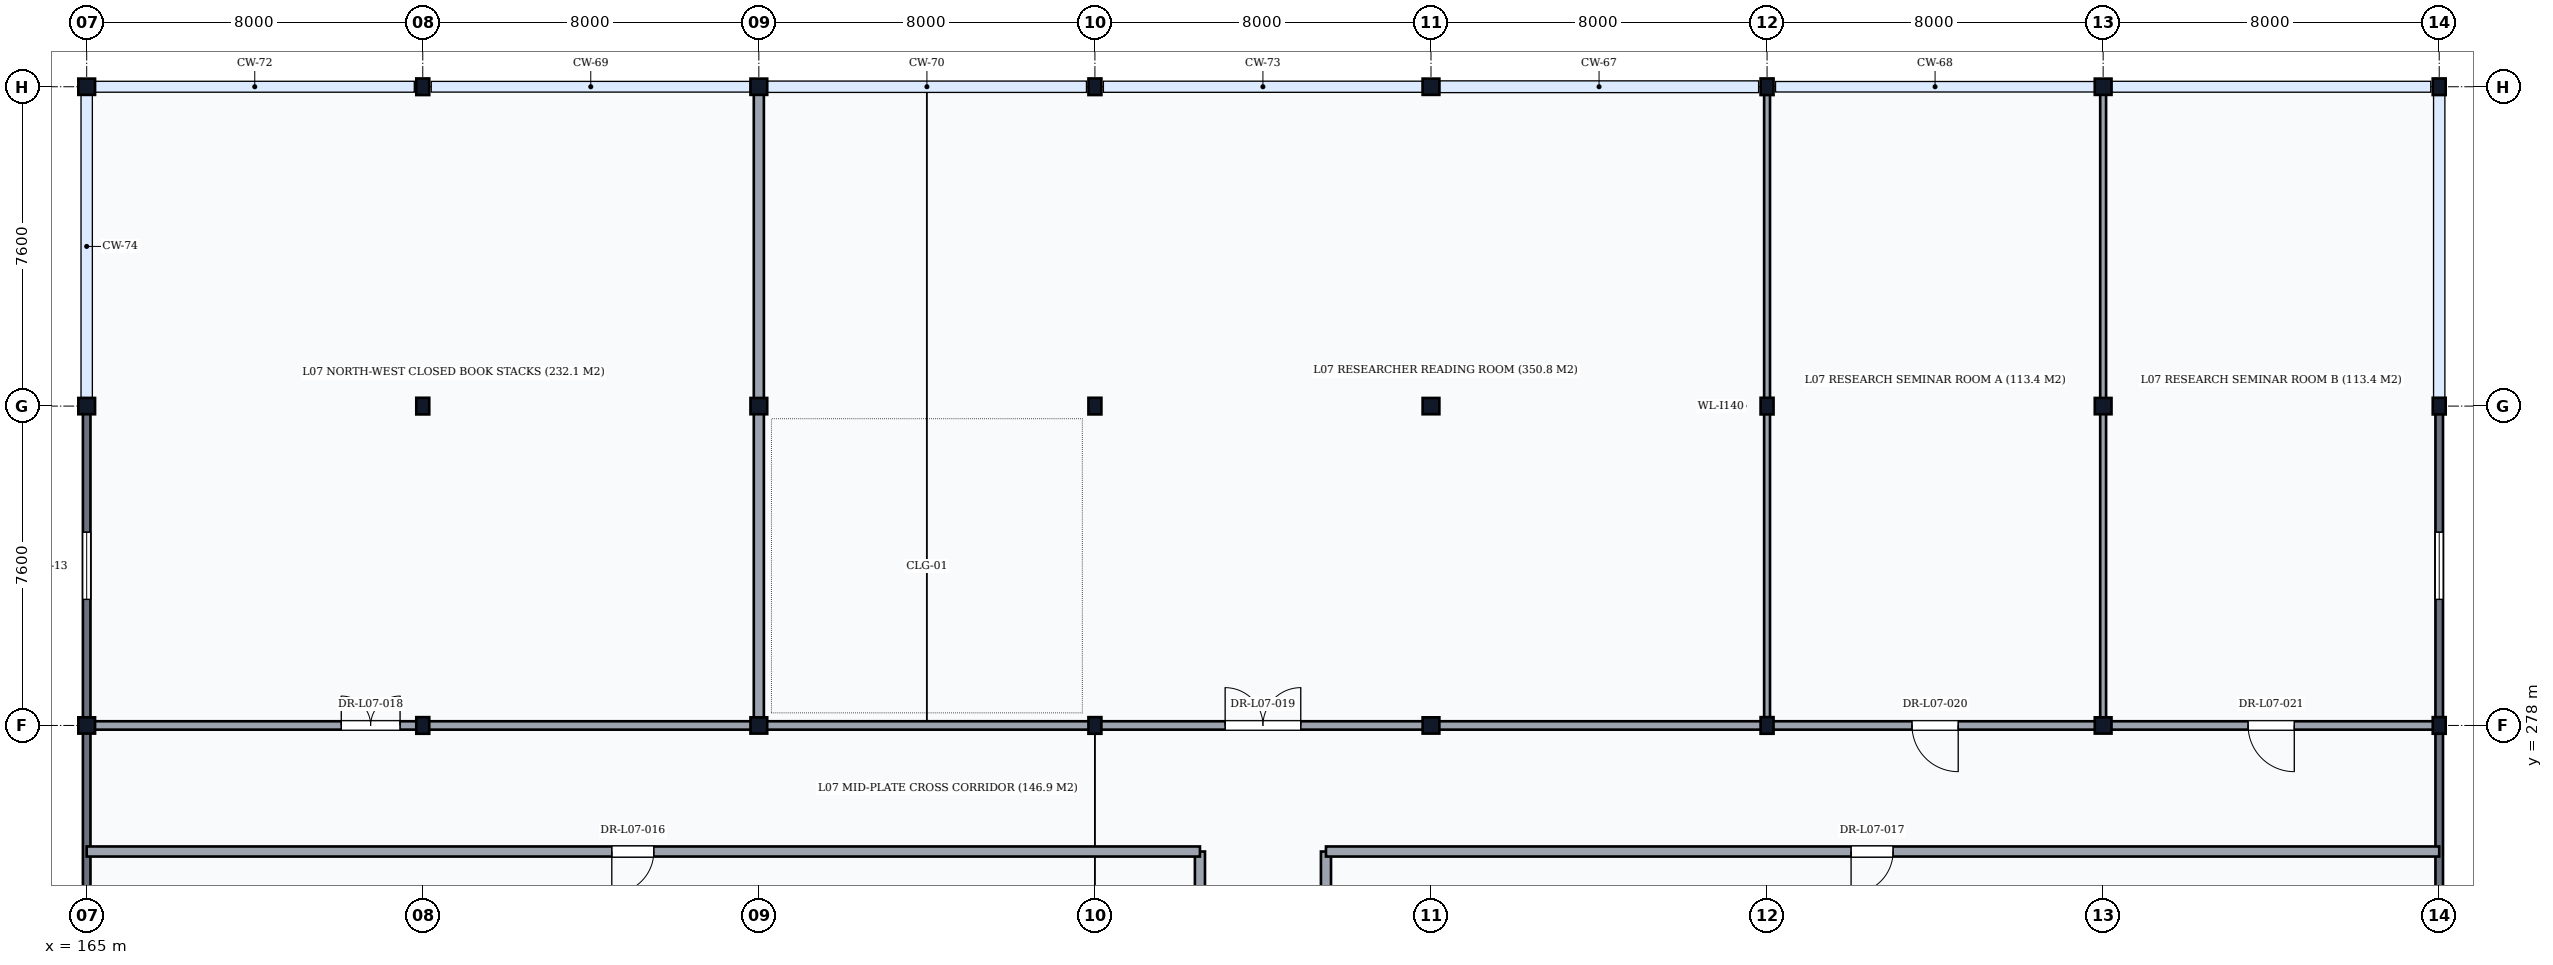
"""IFC4 building model, lengths in metres.
Left out: names, types, materials, properties, quantities, classifications, styles, units other than length and angle.
Written with IfcOpenShell. Run it as: python <this file> out.ifc"""

import sys

from ifc_helpers import new_model, si_unit, direction, frame, frame_2d, origin, origin_2d, place, context, subcontext, project, spatial, rectangle, i_section, extrude, element, fill, save


model = new_model("IFC4")
c1 = context("Model", 3, precision=1e-05, world=origin(), true_north=direction((0.0, 1.0)))
c2 = subcontext(c1, "Body", "Model", "MODEL_VIEW")
j1 = project(units=[si_unit("LENGTHUNIT", "METRE"), si_unit("PLANEANGLEUNIT", "RADIAN")], contexts=[c1])
p1 = place(None, origin())
s1 = spatial("IfcSite", under=j1, at=p1, CompositionType="ELEMENT")
p2 = place(p1, origin())
s2 = spatial("IfcBuilding", under=s1, at=p2, CompositionType="ELEMENT")
p3 = place(p2, frame((0.0, 0.0, 28.2)))
s3 = spatial("IfcBuildingStorey", under=s2, at=p3, CompositionType="ELEMENT", Elevation=28.2)
for number, where, z_axis, x_axis in (
    (1, (165.0, 278.0, 0.0), (0.0, 0.0, 1.0), (1.0, 0.0, 0.0)),
    (2, (165.0, 285.6, 0.0), (0.0, 0.0, 1.0), (1.0, 0.0, 0.0)),
    (3, (165.0, 293.2, 0.0), (0.0, 0.0, 1.0), (1.0, 0.0, 0.0)),
):
    element("IfcColumn", number, at=place(p3, frame(where, z_axis=z_axis, x_axis=x_axis)), inside=s3, PredefinedType="COLUMN", context=c2, shape_type="SweptSolid", body=[
        extrude(i_section(OverallWidth=0.398, OverallDepth=0.387, WebThickness=0.021, FlangeThickness=0.033, FilletRadius=0.015, at=origin_2d()), origin(), (0.0, 0.0, 1.0), 3.9),
    ])
for number, where, z_axis, x_axis in (
    (4, (173.0, 278.0, 0.0), (0.0, 0.0, 1.0), (1.0, 0.0, 0.0)),
    (5, (173.0, 285.6, 0.0), (0.0, 0.0, 1.0), (1.0, 0.0, 0.0)),
    (6, (173.0, 293.2, 0.0), (0.0, 0.0, 1.0), (1.0, 0.0, 0.0)),
):
    element("IfcColumn", number, at=place(p3, frame(where, z_axis=z_axis, x_axis=x_axis)), inside=s3, PredefinedType="COLUMN", context=c2, shape_type="SweptSolid", body=[
        extrude(i_section(OverallWidth=0.308, OverallDepth=0.395, WebThickness=0.021, FlangeThickness=0.04, FilletRadius=0.027, at=origin_2d()), origin(), (0.0, 0.0, 1.0), 3.9),
    ])
for number, where, z_axis, x_axis in (
    (7, (181.0, 278.0, 0.0), (0.0, 0.0, 1.0), (1.0, 0.0, 0.0)),
    (8, (181.0, 285.6, 0.0), (0.0, 0.0, 1.0), (1.0, 0.0, 0.0)),
    (9, (181.0, 293.2, 0.0), (0.0, 0.0, 1.0), (1.0, 0.0, 0.0)),
):
    element("IfcColumn", number, at=place(p3, frame(where, z_axis=z_axis, x_axis=x_axis)), inside=s3, PredefinedType="COLUMN", context=c2, shape_type="SweptSolid", body=[
        extrude(i_section(OverallWidth=0.398, OverallDepth=0.387, WebThickness=0.021, FlangeThickness=0.033, FilletRadius=0.015, at=origin_2d()), origin(), (0.0, 0.0, 1.0), 3.9),
    ])
for number, where, z_axis, x_axis in (
    (10, (189.0, 278.0, 0.0), (0.0, 0.0, 1.0), (1.0, 0.0, 0.0)),
    (11, (189.0, 285.6, 0.0), (0.0, 0.0, 1.0), (1.0, 0.0, 0.0)),
    (12, (189.0, 293.2, 0.0), (0.0, 0.0, 1.0), (1.0, 0.0, 0.0)),
):
    element("IfcColumn", number, at=place(p3, frame(where, z_axis=z_axis, x_axis=x_axis)), inside=s3, PredefinedType="COLUMN", context=c2, shape_type="SweptSolid", body=[
        extrude(i_section(OverallWidth=0.308, OverallDepth=0.395, WebThickness=0.021, FlangeThickness=0.04, FilletRadius=0.027, at=origin_2d()), origin(), (0.0, 0.0, 1.0), 3.9),
    ])
for number, where, z_axis, x_axis in (
    (13, (197.0, 278.0, 0.0), (0.0, 0.0, 1.0), (1.0, 0.0, 0.0)),
    (14, (197.0, 285.6, 0.0), (0.0, 0.0, 1.0), (1.0, 0.0, 0.0)),
    (15, (197.0, 293.2, 0.0), (0.0, 0.0, 1.0), (1.0, 0.0, 0.0)),
):
    element("IfcColumn", number, at=place(p3, frame(where, z_axis=z_axis, x_axis=x_axis)), inside=s3, PredefinedType="COLUMN", context=c2, shape_type="SweptSolid", body=[
        extrude(i_section(OverallWidth=0.398, OverallDepth=0.387, WebThickness=0.021, FlangeThickness=0.033, FilletRadius=0.015, at=origin_2d()), origin(), (0.0, 0.0, 1.0), 3.9),
    ])
for number, where, z_axis, x_axis in (
    (16, (205.0, 278.0, 0.0), (0.0, 0.0, 1.0), (1.0, 0.0, 0.0)),
    (17, (205.0, 285.6, 0.0), (0.0, 0.0, 1.0), (1.0, 0.0, 0.0)),
    (18, (205.0, 293.2, 0.0), (0.0, 0.0, 1.0), (1.0, 0.0, 0.0)),
):
    element("IfcColumn", number, at=place(p3, frame(where, z_axis=z_axis, x_axis=x_axis)), inside=s3, PredefinedType="COLUMN", context=c2, shape_type="SweptSolid", body=[
        extrude(i_section(OverallWidth=0.308, OverallDepth=0.395, WebThickness=0.021, FlangeThickness=0.04, FilletRadius=0.027, at=origin_2d()), origin(), (0.0, 0.0, 1.0), 3.9),
    ])
for number, where, z_axis, x_axis in (
    (19, (213.0, 278.0, 0.0), (0.0, 0.0, 1.0), (1.0, 0.0, 0.0)),
    (20, (213.0, 285.6, 0.0), (0.0, 0.0, 1.0), (1.0, 0.0, 0.0)),
    (21, (213.0, 293.2, 0.0), (0.0, 0.0, 1.0), (1.0, 0.0, 0.0)),
):
    element("IfcColumn", number, at=place(p3, frame(where, z_axis=z_axis, x_axis=x_axis)), inside=s3, PredefinedType="COLUMN", context=c2, shape_type="SweptSolid", body=[
        extrude(i_section(OverallWidth=0.398, OverallDepth=0.387, WebThickness=0.021, FlangeThickness=0.033, FilletRadius=0.015, at=origin_2d()), origin(), (0.0, 0.0, 1.0), 3.9),
    ])
for number, where, z_axis, x_axis in (
    (22, (221.0, 278.0, 0.0), (0.0, 0.0, 1.0), (1.0, 0.0, 0.0)),
    (23, (221.0, 285.6, 0.0), (0.0, 0.0, 1.0), (1.0, 0.0, 0.0)),
    (24, (221.0, 293.2, 0.0), (0.0, 0.0, 1.0), (1.0, 0.0, 0.0)),
):
    element("IfcColumn", number, at=place(p3, frame(where, z_axis=z_axis, x_axis=x_axis)), inside=s3, PredefinedType="COLUMN", context=c2, shape_type="SweptSolid", body=[
        extrude(i_section(OverallWidth=0.308, OverallDepth=0.395, WebThickness=0.021, FlangeThickness=0.04, FilletRadius=0.027, at=origin_2d()), origin(), (0.0, 0.0, 1.0), 3.9),
    ])
p4 = place(p3, frame((165.0, 270.406, 0.0), z_axis=(0.0, 0.0, 1.0), x_axis=(0.0, 1.0, 0.0)))
e25 = element("IfcWall", 25, at=p4, inside=s3, PredefinedType="SOLIDWALL", context=c2, shape_type="SweptSolid", body=[
    extrude(rectangle(XDim=7.588, YDim=0.18, at=frame_2d((3.794, 0.0))), origin(), (0.0, 0.0, 1.0), 3.388),
])
p5 = place(p4, frame((1.622, 0.0, 0.95)))
e26 = element("IfcOpeningElement", 26, at=p5, cuts=e25, PredefinedType="OPENING", context=c2, shape_type="SweptSolid", body=[
    extrude(rectangle(XDim=1.8, YDim=2.0, at=frame_2d((0.9, 1.0))), frame((0.0, 0.105, 0.0), z_axis=(0.0, -1.0, 0.0), x_axis=(1.0, 0.0, 0.0)), (0.0, 0.0, 1.0), 0.21),
])
p6 = place(p3, frame((165.0, 278.006, 0.0), z_axis=(0.0, 0.0, 1.0), x_axis=(0.0, 1.0, 0.0)))
e27 = element("IfcWall", 27, at=p6, inside=s3, PredefinedType="SOLIDWALL", context=c2, shape_type="SweptSolid", body=[
    extrude(rectangle(XDim=7.588, YDim=0.18, at=frame_2d((3.794, 0.0))), origin(), (0.0, 0.0, 1.0), 3.388),
])
p7 = place(p6, frame((2.994, 0.0, 0.95)))
e28 = element("IfcOpeningElement", 28, at=p7, cuts=e27, PredefinedType="OPENING", context=c2, shape_type="SweptSolid", body=[
    extrude(rectangle(XDim=1.6, YDim=2.0, at=frame_2d((0.8, 1.0))), frame((0.0, 0.105, 0.0), z_axis=(0.0, -1.0, 0.0), x_axis=(1.0, 0.0, 0.0)), (0.0, 0.0, 1.0), 0.21),
])
p8 = place(p3, frame((221.0, 270.406, 0.0), z_axis=(0.0, 0.0, 1.0), x_axis=(0.0, 1.0, 0.0)))
e29 = element("IfcWall", 29, at=p8, inside=s3, PredefinedType="SOLIDWALL", context=c2, shape_type="SweptSolid", body=[
    extrude(rectangle(XDim=7.588, YDim=0.18, at=frame_2d((3.794, 0.0))), origin(), (0.0, 0.0, 1.0), 3.388),
])
p9 = place(p8, frame((1.622, 0.0, 0.95)))
e30 = element("IfcOpeningElement", 30, at=p9, cuts=e29, PredefinedType="OPENING", context=c2, shape_type="SweptSolid", body=[
    extrude(rectangle(XDim=1.8, YDim=2.0, at=frame_2d((0.9, 1.0))), frame((0.0, 0.105, 0.0), z_axis=(0.0, -1.0, 0.0), x_axis=(1.0, 0.0, 0.0)), (0.0, 0.0, 1.0), 0.21),
])
p10 = place(p3, frame((221.0, 278.006, 0.0), z_axis=(0.0, 0.0, 1.0), x_axis=(0.0, 1.0, 0.0)))
e31 = element("IfcWall", 31, at=p10, inside=s3, PredefinedType="SOLIDWALL", context=c2, shape_type="SweptSolid", body=[
    extrude(rectangle(XDim=7.588, YDim=0.18, at=frame_2d((3.794, 0.0))), origin(), (0.0, 0.0, 1.0), 3.388),
])
p11 = place(p10, frame((2.994, 0.0, 0.95)))
e32 = element("IfcOpeningElement", 32, at=p11, cuts=e31, PredefinedType="OPENING", context=c2, shape_type="SweptSolid", body=[
    extrude(rectangle(XDim=1.6, YDim=2.0, at=frame_2d((0.8, 1.0))), frame((0.0, 0.105, 0.0), z_axis=(0.0, -1.0, 0.0), x_axis=(1.0, 0.0, 0.0)), (0.0, 0.0, 1.0), 0.21),
])
for number, where, z_axis, x_axis in (
    (33, (191.5, 258.2, 0.0), (0.0, 0.0, 1.0), (0.0, 1.0, 0.0)),
    (34, (194.5, 258.2, 0.0), (0.0, 0.0, 1.0), (0.0, 1.0, 0.0)),
):
    element("IfcWall", number, at=place(p3, frame(where, z_axis=z_axis, x_axis=x_axis)), inside=s3, PredefinedType="PARTITIONING", context=c2, shape_type="SweptSolid", body=[
        extrude(rectangle(XDim=16.8, YDim=0.24, at=frame_2d((8.4, 0.0))), origin(), (0.0, 0.0, 1.0), 3.66),
    ])
p12 = place(p3, frame((165.0, 275.0, 0.0), z_axis=(0.0, 0.0, 1.0), x_axis=(1.0, 0.0, 0.0)))
e35 = element("IfcWall", 35, at=p12, inside=s3, PredefinedType="PARTITIONING", context=c2, shape_type="SweptSolid", body=[
    extrude(rectangle(XDim=26.5, YDim=0.24, at=frame_2d((13.25, 0.0))), origin(), (0.0, 0.0, 1.0), 3.66),
])
p13 = place(p12, frame((12.5, 0.0, 0.0)))
e36 = element("IfcOpeningElement", 36, at=p13, cuts=e35, PredefinedType="OPENING", context=c2, shape_type="SweptSolid", body=[
    extrude(rectangle(XDim=1.0, YDim=2.1, at=frame_2d((0.5, 1.05))), frame((0.0, 0.135, 0.0), z_axis=(0.0, -1.0, 0.0), x_axis=(1.0, 0.0, 0.0)), (0.0, 0.0, 1.0), 0.27),
])
p14 = place(p3, frame((194.5, 275.0, 0.0), z_axis=(0.0, 0.0, 1.0), x_axis=(1.0, 0.0, 0.0)))
e37 = element("IfcWall", 37, at=p14, inside=s3, PredefinedType="PARTITIONING", context=c2, shape_type="SweptSolid", body=[
    extrude(rectangle(XDim=26.5, YDim=0.24, at=frame_2d((13.25, 0.0))), origin(), (0.0, 0.0, 1.0), 3.66),
])
p15 = place(p14, frame((12.5, 0.0, 0.0)))
e38 = element("IfcOpeningElement", 38, at=p15, cuts=e37, PredefinedType="OPENING", context=c2, shape_type="SweptSolid", body=[
    extrude(rectangle(XDim=1.0, YDim=2.1, at=frame_2d((0.5, 1.05))), frame((0.0, 0.135, 0.0), z_axis=(0.0, -1.0, 0.0), x_axis=(1.0, 0.0, 0.0)), (0.0, 0.0, 1.0), 0.27),
])
p16 = place(p3, frame((165.0, 278.0, 0.0), z_axis=(0.0, 0.0, 1.0), x_axis=(1.0, 0.0, 0.0)))
e39 = element("IfcWall", 39, at=p16, inside=s3, PredefinedType="PARTITIONING", context=c2, shape_type="SweptSolid", body=[
    extrude(rectangle(XDim=56.0, YDim=0.2, at=frame_2d((28.0, 0.0))), origin(), (0.0, 0.0, 1.0), 3.058),
])
p17 = place(p16, frame((6.06, 0.0, 0.0)))
e40 = element("IfcOpeningElement", 40, at=p17, cuts=e39, PredefinedType="OPENING", context=c2, shape_type="SweptSolid", body=[
    extrude(rectangle(XDim=1.4, YDim=2.1, at=frame_2d((0.7, 1.05))), frame((0.0, 0.115, 0.0), z_axis=(0.0, -1.0, 0.0), x_axis=(1.0, 0.0, 0.0)), (0.0, 0.0, 1.0), 0.23),
])
p18 = place(p16, frame((27.1, 0.0, 0.0)))
e41 = element("IfcOpeningElement", 41, at=p18, cuts=e39, PredefinedType="OPENING", context=c2, shape_type="SweptSolid", body=[
    extrude(rectangle(XDim=1.8, YDim=2.4, at=frame_2d((0.9, 1.2))), frame((0.0, 0.115, 0.0), z_axis=(0.0, -1.0, 0.0), x_axis=(1.0, 0.0, 0.0)), (0.0, 0.0, 1.0), 0.23),
])
p19 = place(p16, frame((43.45, 0.0, 0.0)))
e42 = element("IfcOpeningElement", 42, at=p19, cuts=e39, PredefinedType="OPENING", context=c2, shape_type="SweptSolid", body=[
    extrude(rectangle(XDim=1.1, YDim=2.1, at=frame_2d((0.55, 1.05))), frame((0.0, 0.115, 0.0), z_axis=(0.0, -1.0, 0.0), x_axis=(1.0, 0.0, 0.0)), (0.0, 0.0, 1.0), 0.23),
])
p20 = place(p16, frame((51.45, 0.0, 0.0)))
e43 = element("IfcOpeningElement", 43, at=p20, cuts=e39, PredefinedType="OPENING", context=c2, shape_type="SweptSolid", body=[
    extrude(rectangle(XDim=1.1, YDim=2.1, at=frame_2d((0.55, 1.05))), frame((0.0, 0.115, 0.0), z_axis=(0.0, -1.0, 0.0), x_axis=(1.0, 0.0, 0.0)), (0.0, 0.0, 1.0), 0.23),
])
p21 = place(p3, frame((181.0, 278.0, 0.0), z_axis=(0.0, 0.0, 1.0), x_axis=(0.0, 1.0, 0.0)))
e44 = element("IfcWall", 44, at=p21, inside=s3, PredefinedType="PARTITIONING", context=c2, shape_type="SweptSolid", body=[
    extrude(rectangle(XDim=15.2, YDim=0.24, at=frame_2d((7.6, 0.0))), origin(), (0.0, 0.0, 1.0), 3.208),
])
for number, where, z_axis, x_axis in (
    (45, (205.0, 278.0, 0.0), (0.0, 0.0, 1.0), (0.0, 1.0, 0.0)),
    (46, (213.0, 278.0, 0.0), (0.0, 0.0, 1.0), (0.0, 1.0, 0.0)),
):
    element("IfcWall", number, at=place(p3, frame(where, z_axis=z_axis, x_axis=x_axis)), inside=s3, PredefinedType="PARTITIONING", context=c2, shape_type="SweptSolid", body=[
        extrude(rectangle(XDim=15.2, YDim=0.14, at=frame_2d((7.6, 0.0))), origin(), (0.0, 0.0, 1.0), 3.208),
    ])
p22 = place(p7, origin())
e47 = element("IfcWindow", 47, at=p22, inside=s3, PartitioningType="SINGLE_PANEL", PredefinedType="WINDOW", context=c2, shape_type="SweptSolid", body=[
    extrude(rectangle(XDim=1.6, YDim=2.0, at=frame_2d((0.8, 1.0))), frame((0.0, 0.03, 0.0), z_axis=(0.0, -1.0, 0.0), x_axis=(1.0, 0.0, 0.0)), (0.0, 0.0, 1.0), 0.06),
])
fill(e28, e47)
p23 = place(p11, origin())
e48 = element("IfcWindow", 48, at=p23, inside=s3, PartitioningType="SINGLE_PANEL", PredefinedType="WINDOW", context=c2, shape_type="SweptSolid", body=[
    extrude(rectangle(XDim=1.6, YDim=2.0, at=frame_2d((0.8, 1.0))), frame((0.0, 0.03, 0.0), z_axis=(0.0, -1.0, 0.0), x_axis=(1.0, 0.0, 0.0)), (0.0, 0.0, 1.0), 0.06),
])
fill(e32, e48)
p24 = place(p13, frame((1.0, 0.0, 0.0), z_axis=(0.0, 0.0, 1.0), x_axis=(-1.0, 0.0, 0.0)))
e49 = element("IfcDoor", 49, at=p24, inside=s3, OperationType="SINGLE_SWING_RIGHT", PredefinedType="DOOR", context=c2, shape_type="SweptSolid", body=[
    extrude(rectangle(XDim=1.0, YDim=2.1, at=frame_2d((0.5, 1.05))), frame((0.0, 0.025, 0.0), z_axis=(0.0, -1.0, 0.0), x_axis=(1.0, 0.0, 0.0)), (0.0, 0.0, 1.0), 0.05),
])
fill(e36, e49)
p25 = place(p15, frame((1.0, 0.0, 0.0), z_axis=(0.0, 0.0, 1.0), x_axis=(-1.0, 0.0, 0.0)))
e50 = element("IfcDoor", 50, at=p25, inside=s3, OperationType="SINGLE_SWING_RIGHT", PredefinedType="DOOR", context=c2, shape_type="SweptSolid", body=[
    extrude(rectangle(XDim=1.0, YDim=2.1, at=frame_2d((0.5, 1.05))), frame((0.0, 0.025, 0.0), z_axis=(0.0, -1.0, 0.0), x_axis=(1.0, 0.0, 0.0)), (0.0, 0.0, 1.0), 0.05),
])
fill(e38, e50)
p26 = place(p17, origin())
e51 = element("IfcDoor", 51, at=p26, inside=s3, OperationType="DOUBLE_DOOR_SINGLE_SWING", PredefinedType="DOOR", context=c2, shape_type="SweptSolid", body=[
    extrude(rectangle(XDim=1.4, YDim=2.1, at=frame_2d((0.7, 1.05))), frame((0.0, 0.025, 0.0), z_axis=(0.0, -1.0, 0.0), x_axis=(1.0, 0.0, 0.0)), (0.0, 0.0, 1.0), 0.05),
])
fill(e40, e51)
p27 = place(p18, origin())
e52 = element("IfcDoor", 52, at=p27, inside=s3, OperationType="DOUBLE_DOOR_SINGLE_SWING", PredefinedType="DOOR", context=c2, shape_type="SweptSolid", body=[
    extrude(rectangle(XDim=1.8, YDim=2.4, at=frame_2d((0.9, 1.2))), frame((0.0, 0.025, 0.0), z_axis=(0.0, -1.0, 0.0), x_axis=(1.0, 0.0, 0.0)), (0.0, 0.0, 1.0), 0.05),
])
fill(e41, e52)
p28 = place(p19, origin())
e53 = element("IfcDoor", 53, at=p28, inside=s3, OperationType="SINGLE_SWING_RIGHT", PredefinedType="DOOR", context=c2, shape_type="SweptSolid", body=[
    extrude(rectangle(XDim=1.1, YDim=2.1, at=frame_2d((0.55, 1.05))), frame((0.0, 0.025, 0.0), z_axis=(0.0, -1.0, 0.0), x_axis=(1.0, 0.0, 0.0)), (0.0, 0.0, 1.0), 0.05),
])
fill(e42, e53)
p29 = place(p20, origin())
e54 = element("IfcDoor", 54, at=p29, inside=s3, OperationType="SINGLE_SWING_RIGHT", PredefinedType="DOOR", context=c2, shape_type="SweptSolid", body=[
    extrude(rectangle(XDim=1.1, YDim=2.1, at=frame_2d((0.55, 1.05))), frame((0.0, 0.025, 0.0), z_axis=(0.0, -1.0, 0.0), x_axis=(1.0, 0.0, 0.0)), (0.0, 0.0, 1.0), 0.05),
])
fill(e43, e54)
save(model, sys.argv[1])
